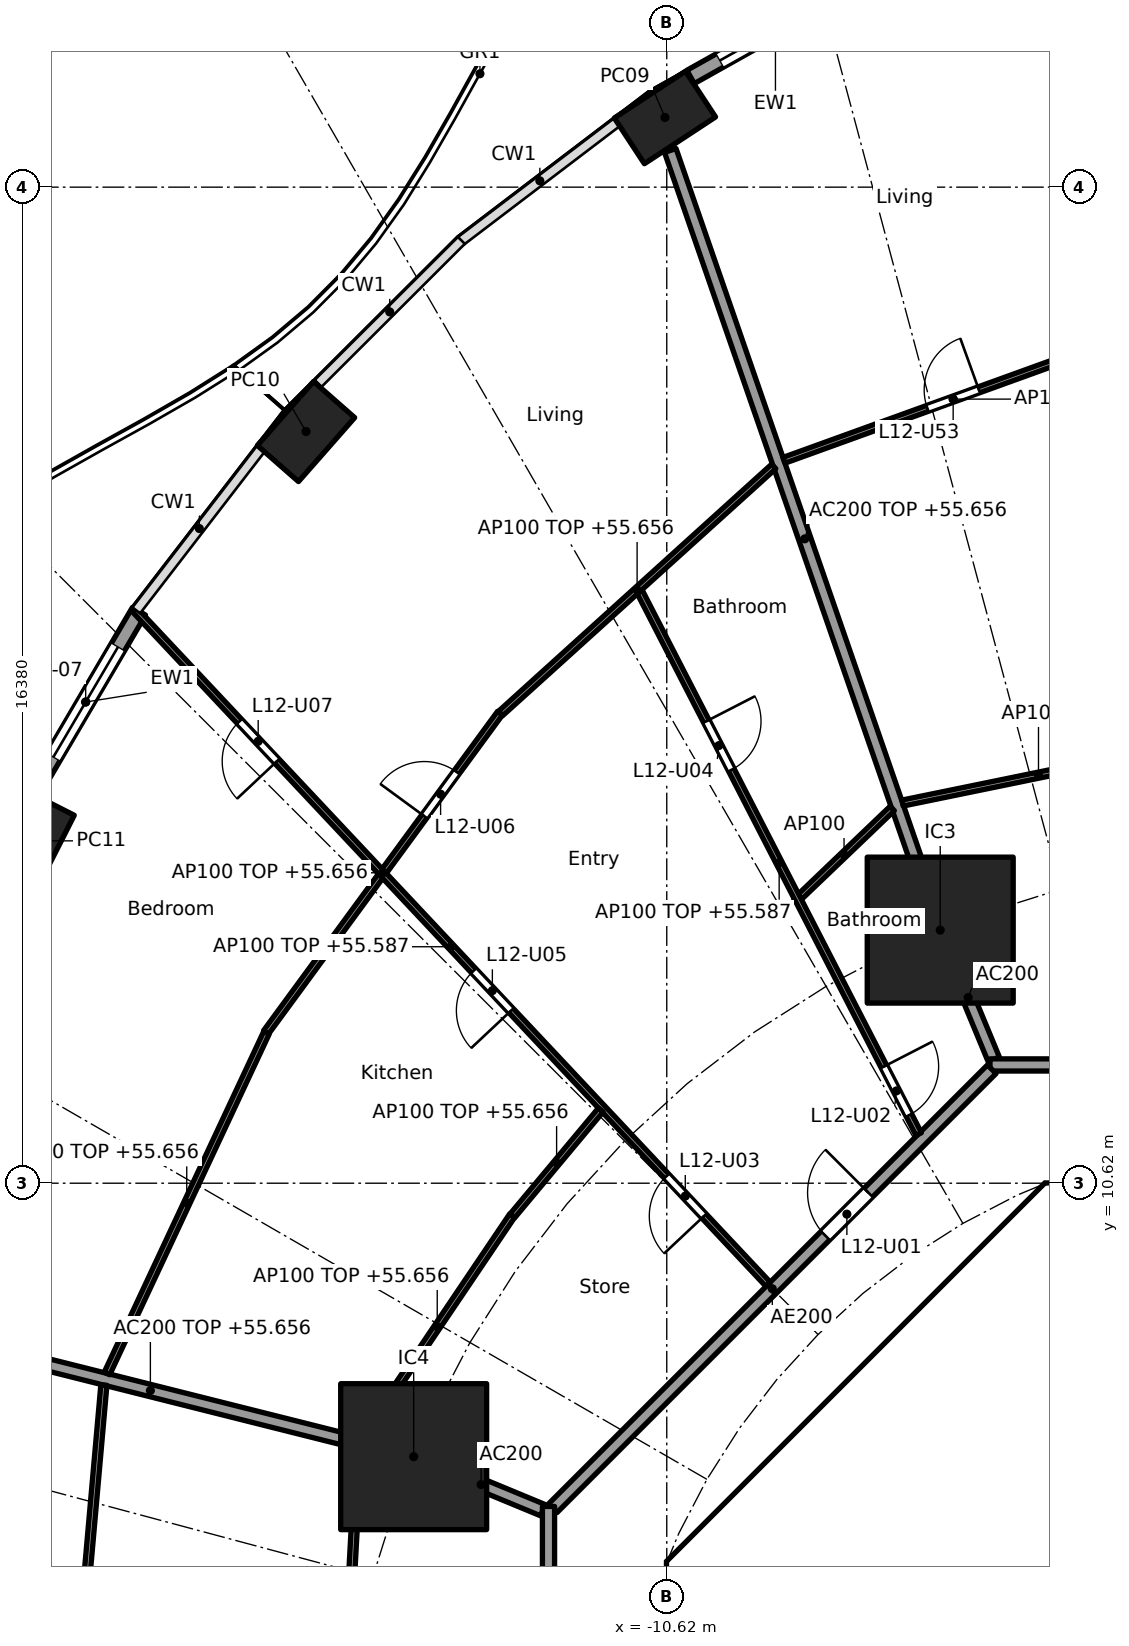
"""IFC4 building model, lengths in metres.
Left out: names, types, materials, properties, quantities, classifications, styles, units other than length and angle.
Written with IfcOpenShell. Run it as: python <this file> out.ifc"""

import sys

from ifc_helpers import new_model, si_unit, direction, frame, frame_2d, origin, origin_2d, place, context, subcontext, project, spatial, polyline, rectangle, hollow_rectangle, outline, extrude, element, fill, save


model = new_model("IFC4")
c1 = context("Model", 3, precision=1e-05, world=origin(), true_north=direction((0.0, 1.0)))
c2 = subcontext(c1, "Body", "Model", "MODEL_VIEW")
j1 = project(units=[si_unit("LENGTHUNIT", "METRE"), si_unit("PLANEANGLEUNIT", "RADIAN")], contexts=[c1])
p1 = place(None, origin())
s1 = spatial("IfcSite", under=j1, at=p1, CompositionType="ELEMENT")
p2 = place(p1, origin())
s2 = spatial("IfcBuilding", under=s1, at=p2, CompositionType="ELEMENT")
p3 = place(p2, frame((0.0, 0.0, 52.9)))
s3 = spatial("IfcBuildingStorey", under=s2, at=p3, CompositionType="ELEMENT", Elevation=52.9)
for number, where, z_axis, x_axis in (
    (1, (-10.65, 28.146, 0.0), (0.0, 0.0, 1.0), (-0.836, -0.549, 0.0)),
    (2, (-16.552, 22.981, 0.0), (0.0, 0.0, 1.0), (-0.66, -0.751, 0.0)),
    (3, (-21.082, 16.25, 0.0), (0.0, 0.0, 1.0), (-0.452, -0.892, 0.0)),
):
    element("IfcColumn", number, at=place(p3, frame(where, z_axis=z_axis, x_axis=x_axis)), inside=s3, PredefinedType="COLUMN", context=c2, shape_type="SweptSolid", body=[
        extrude(hollow_rectangle(XDim=1.4, YDim=0.9, WallThickness=0.05, at=origin_2d()), origin(), (0.0, 0.0, 1.0), 3.7),
    ])
for number, where, z_axis, x_axis in (
    (4, (-6.123, 14.782, 0.0), (0.0, 0.0, 1.0), (1.0, 0.0, 0.0)),
    (5, (-14.782, 6.123, 0.0), (0.0, 0.0, 1.0), (1.0, 0.0, 0.0)),
):
    element("IfcColumn", number, at=place(p3, frame(where, z_axis=z_axis, x_axis=x_axis)), inside=s3, PredefinedType="COLUMN", context=c2, shape_type="SweptSolid", body=[
        extrude(rectangle(XDim=2.4, YDim=2.4, at=origin_2d()), origin(), (0.0, 0.0, 1.0), 3.7),
    ])
p4 = place(p3, frame((-10.228, 28.812, 0.0), z_axis=(0.0, 0.0, 1.0), x_axis=(0.872084295691, 0.489355679653, 0.0)))
e6 = element("IfcWall", 6, at=p4, inside=s3, PredefinedType="SOLIDWALL", context=c2, shape_type="SweptSolid", body=[
    extrude(rectangle(XDim=3.201, YDim=0.25, at=frame_2d((1.601, 0.0))), origin(), (0.0, 0.0, 1.0), 3.44),
])
p5 = place(p4, frame((0.551, 0.0, 0.0)))
e7 = element("IfcOpeningElement", 7, at=p5, cuts=e6, PredefinedType="OPENING", context=c2, shape_type="SweptSolid", body=[
    extrude(rectangle(XDim=2.1, YDim=2.4, at=frame_2d((1.05, 1.2))), frame((0.0, 0.135, 0.0), z_axis=(0.0, -1.0, 0.0), x_axis=(1.0, 0.0, 0.0)), (0.0, 0.0, 1.0), 0.27),
])
p6 = place(p3, frame((-21.052, 17.04, 0.0), z_axis=(0.0, 0.0, 1.0), x_axis=(0.506311160839, 0.862350861546, 0.0)))
e8 = element("IfcWall", 8, at=p6, inside=s3, PredefinedType="SOLIDWALL", context=c2, shape_type="SweptSolid", body=[
    extrude(rectangle(XDim=3.462, YDim=0.25, at=frame_2d((1.731, 0.0))), origin(), (0.0, 0.0, 1.0), 3.44),
])
p7 = place(p6, frame((0.681, 0.0, 0.0)))
e9 = element("IfcOpeningElement", 9, at=p7, cuts=e8, PredefinedType="OPENING", context=c2, shape_type="SweptSolid", body=[
    extrude(rectangle(XDim=2.1, YDim=2.4, at=frame_2d((1.05, 1.2))), frame((0.0, 0.135, 0.0), z_axis=(0.0, -1.0, 0.0), x_axis=(1.0, 0.0, 0.0)), (0.0, 0.0, 1.0), 0.27),
])
p8 = place(p3, frame((-4.613, 9.988, 0.0), z_axis=(0.0, 0.0, 1.0), x_axis=(-0.707106781187, -0.707106781187, 0.0)))
e10 = element("IfcWall", 10, at=p8, inside=s3, PredefinedType="SHEAR", context=c2, shape_type="SweptSolid", body=[
    extrude(rectangle(XDim=7.602, YDim=0.6, at=frame_2d((3.801, 0.0))), origin(), (0.0, 0.0, 1.0), 3.44),
])
p9 = place(p8, frame((0.351, 0.0, 0.0)))
e11 = element("IfcOpeningElement", 11, at=p9, cuts=e10, PredefinedType="OPENING", context=c2, shape_type="SweptSolid", body=[
    extrude(rectangle(XDim=1.1, YDim=2.1, at=frame_2d((0.55, 1.05))), frame((0.0, 0.31, 0.0), z_axis=(0.0, -1.0, 0.0), x_axis=(1.0, 0.0, 0.0)), (0.0, 0.0, 1.0), 0.62),
])
p10 = place(p3, frame((-5.8, 4.3, 0.0), z_axis=(0.0, 0.0, 1.0), x_axis=(0.0, 1.0, 0.0)))
e12 = element("IfcWall", 12, at=p10, inside=s3, PredefinedType="PARTITIONING", context=c2, shape_type="SweptSolid", body=[
    extrude(rectangle(XDim=3.927, YDim=0.15, at=frame_2d((1.963, 0.0))), origin(), (0.0, 0.0, 1.0), 3.44),
])
p11 = place(p10, frame((1.551, 0.0, 0.0)))
e13 = element("IfcOpeningElement", 13, at=p11, cuts=e12, PredefinedType="OPENING", context=c2, shape_type="SweptSolid", body=[
    extrude(rectangle(XDim=0.9, YDim=2.1, at=frame_2d((0.45, 1.05))), frame((0.0, 0.085, 0.0), z_axis=(0.0, -1.0, 0.0), x_axis=(1.0, 0.0, 0.0)), (0.0, 0.0, 1.0), 0.17),
])
p12 = place(p3, origin())
e14 = element("IfcWall", 14, at=p12, inside=s3, PredefinedType="SHEAR", context=c2, shape_type="SweptSolid", body=[
    extrude(outline(polyline([(-10.2, 4.825), (-9.776, 4.401), (-10.025, 4.152), (-10.025, 3.801), (-10.625, 3.801), (-10.625, 4.401), (-10.2, 4.825)])), origin(), (0.0, 0.0, 1.0), 3.44),
])
p13 = place(p3, origin())
e15 = element("IfcWall", 15, at=p13, inside=s3, PredefinedType="SHEAR", context=c2, shape_type="SweptSolid", body=[
    extrude(outline(polyline([(-4.152, 10.025), (-4.401, 9.776), (-4.825, 10.2), (-4.401, 10.625), (4.401, 10.625), (4.825, 10.2), (4.401, 9.776), (4.152, 10.025), (-4.152, 10.025)])), origin(), (0.0, 0.0, 1.0), 3.44),
])
p14 = place(p3, frame((-5.243, 12.657, 0.0), z_axis=(0.0, 0.0, 1.0), x_axis=(-0.382668627144, 0.923885664896, 0.0)))
e16 = element("IfcWall", 16, at=p14, inside=s3, PredefinedType="PARTITIONING", context=c2, shape_type="SweptSolid", body=[
    extrude(rectangle(XDim=2.2, YDim=0.2, at=frame_2d((1.1, 0.0))), origin(), (0.0, 0.0, 1.0), 3.44),
])
p15 = place(p3, frame((-6.139, 14.829, 0.0), z_axis=(0.0, 0.0, 1.0), x_axis=(-0.327178799566, 0.944962450637, 0.0)))
e17 = element("IfcWall", 17, at=p15, inside=s3, PredefinedType="PARTITIONING", context=c2, shape_type="SweptSolid", body=[
    extrude(rectangle(XDim=13.517, YDim=0.2, at=frame_2d((6.759, 0.0))), origin(), (0.0, 0.0, 1.0), 2.756),
])
p16 = place(p3, frame((-12.657, 5.243, 0.0), z_axis=(0.0, 0.0, 1.0), x_axis=(-0.923885664896, 0.382668627144, 0.0)))
e18 = element("IfcWall", 18, at=p16, inside=s3, PredefinedType="PARTITIONING", context=c2, shape_type="SweptSolid", body=[
    extrude(rectangle(XDim=2.2, YDim=0.2, at=frame_2d((1.1, 0.0))), origin(), (0.0, 0.0, 1.0), 3.44),
])
p17 = place(p3, frame((-14.831, 6.135, 0.0), z_axis=(0.0, 0.0, 1.0), x_axis=(-0.969884949569, 0.243563512454, 0.0)))
e19 = element("IfcWall", 19, at=p17, inside=s3, PredefinedType="PARTITIONING", context=c2, shape_type="SweptSolid", body=[
    extrude(rectangle(XDim=8.829, YDim=0.2, at=frame_2d((4.415, 0.0))), origin(), (0.0, 0.0, 1.0), 2.756),
])
p18 = place(p3, frame((5.104, 12.565, 0.0), z_axis=(0.0, 0.0, 1.0), x_axis=(-1.0, 0.0, 0.0)))
e20 = element("IfcWall", 20, at=p18, inside=s3, PredefinedType="PARTITIONING", context=c2, shape_type="SweptSolid", body=[
    extrude(rectangle(XDim=10.409, YDim=0.2, at=frame_2d((5.205, 0.0))), origin(), (0.0, 0.0, 1.0), 3.44),
])
p19 = place(p18, frame((1.185, 0.0, 0.0)))
e21 = element("IfcOpeningElement", 21, at=p19, cuts=e20, PredefinedType="OPENING", context=c2, shape_type="SweptSolid", body=[
    extrude(rectangle(XDim=1.0, YDim=2.1, at=frame_2d((0.5, 1.05))), frame((0.0, 0.11, 0.0), z_axis=(0.0, -1.0, 0.0), x_axis=(1.0, 0.0, 0.0)), (0.0, 0.0, 1.0), 0.22),
])
p20 = place(p3, frame((-5.275, 12.494, 0.0), z_axis=(0.0, 0.0, 1.0), x_axis=(-0.707106781187, -0.707106781187, 0.0)))
e22 = element("IfcWall", 22, at=p20, inside=s3, PredefinedType="PARTITIONING", context=c2, shape_type="SweptSolid", body=[
    extrude(rectangle(XDim=10.209, YDim=0.2, at=frame_2d((5.104, 0.0))), origin(), (0.0, 0.0, 1.0), 3.44),
])
p21 = place(p20, frame((2.87, 0.0, 0.0)))
e23 = element("IfcOpeningElement", 23, at=p21, cuts=e22, PredefinedType="OPENING", context=c2, shape_type="SweptSolid", body=[
    extrude(rectangle(XDim=1.0, YDim=2.1, at=frame_2d((0.5, 1.05))), frame((0.0, 0.11, 0.0), z_axis=(0.0, -1.0, 0.0), x_axis=(1.0, 0.0, 0.0)), (0.0, 0.0, 1.0), 0.22),
])
p22 = place(p3, frame((-12.565, 5.304, 0.0), z_axis=(0.0, 0.0, 1.0), x_axis=(0.0, -1.0, 0.0)))
e24 = element("IfcWall", 24, at=p22, inside=s3, PredefinedType="PARTITIONING", context=c2, shape_type="SweptSolid", body=[
    extrude(rectangle(XDim=10.409, YDim=0.2, at=frame_2d((5.205, 0.0))), origin(), (0.0, 0.0, 1.0), 3.44),
])
p23 = place(p22, frame((6.106, 0.0, 0.0)))
e25 = element("IfcOpeningElement", 25, at=p23, cuts=e24, PredefinedType="OPENING", context=c2, shape_type="SweptSolid", body=[
    extrude(rectangle(XDim=1.0, YDim=2.1, at=frame_2d((0.5, 1.05))), frame((0.0, 0.11, 0.0), z_axis=(0.0, -1.0, 0.0), x_axis=(1.0, 0.0, 0.0)), (0.0, 0.0, 1.0), 0.22),
])
p24 = place(p3, frame((-2.272, 17.789, 0.0), z_axis=(0.0, 0.0, 1.0), x_axis=(-0.979595137747, -0.200981009307, 0.0)))
e26 = element("IfcWall", 26, at=p24, inside=s3, PredefinedType="PARTITIONING", context=c2, shape_type="SweptSolid", body=[
    extrude(rectangle(XDim=4.562, YDim=0.1, at=frame_2d((2.281, 0.0))), origin(), (0.0, 0.0, 1.0), 2.756),
])
p25 = place(p3, frame((-3.128, 24.521, 0.0), z_axis=(0.0, 0.0, 1.0), x_axis=(-0.940401494588, -0.340066212636, 0.0)))
e27 = element("IfcWall", 27, at=p25, inside=s3, PredefinedType="PARTITIONING", context=c2, shape_type="SweptSolid", body=[
    extrude(rectangle(XDim=5.917, YDim=0.1, at=frame_2d((2.958, 0.0))), origin(), (0.0, 0.0, 1.0), 2.756),
])
p26 = place(p25, frame((2.509, 0.0, 0.0)))
e28 = element("IfcOpeningElement", 28, at=p26, cuts=e27, PredefinedType="OPENING", context=c2, shape_type="SweptSolid", body=[
    extrude(rectangle(XDim=0.9, YDim=2.1, at=frame_2d((0.45, 1.05))), frame((0.0, 0.06, 0.0), z_axis=(0.0, -1.0, 0.0), x_axis=(1.0, 0.0, 0.0)), (0.0, 0.0, 1.0), 0.12),
])
p27 = place(p3, frame((-6.912, 16.782, 0.0), z_axis=(0.0, 0.0, 1.0), x_axis=(-0.722789289931, -0.691068478778, 0.0)))
e29 = element("IfcWall", 29, at=p27, inside=s3, PredefinedType="PARTITIONING", context=c2, shape_type="SweptSolid", body=[
    extrude(rectangle(XDim=2.194, YDim=0.1, at=frame_2d((1.097, 0.0))), origin(), (0.0, 0.0, 1.0), 3.44),
])
p28 = place(p3, frame((-8.861, 22.407, 0.0), z_axis=(0.0, 0.0, 1.0), x_axis=(-0.741713303551, -0.670717060567, 0.0)))
e30 = element("IfcWall", 30, at=p28, inside=s3, PredefinedType="PARTITIONING", context=c2, shape_type="SweptSolid", body=[
    extrude(rectangle(XDim=6.059, YDim=0.1, at=frame_2d((3.03, 0.0))), origin(), (0.0, 0.0, 1.0), 2.756),
])
p29 = place(p3, frame((-6.477, 11.427, 0.0), z_axis=(0.0, 0.0, 1.0), x_axis=(-0.457464037982, 0.889228122561, 0.0)))
e31 = element("IfcWall", 31, at=p29, inside=s3, PredefinedType="PARTITIONING", context=c2, shape_type="SweptSolid", body=[
    extrude(rectangle(XDim=10.032, YDim=0.1, at=frame_2d((5.016, 0.0))), origin(), (0.0, 0.0, 1.0), 2.687),
])
p30 = place(p29, frame((0.35, 0.0, 0.0)))
e32 = element("IfcOpeningElement", 32, at=p30, cuts=e31, PredefinedType="OPENING", context=c2, shape_type="SweptSolid", body=[
    extrude(rectangle(XDim=0.9, YDim=2.1, at=frame_2d((0.45, 1.05))), frame((0.0, 0.06, 0.0), z_axis=(0.0, -1.0, 0.0), x_axis=(1.0, 0.0, 0.0)), (0.0, 0.0, 1.0), 0.12),
])
p31 = place(p29, frame((6.735, 0.0, 0.0)))
e33 = element("IfcOpeningElement", 33, at=p31, cuts=e31, PredefinedType="OPENING", context=c2, shape_type="SweptSolid", body=[
    extrude(rectangle(XDim=0.9, YDim=2.1, at=frame_2d((0.45, 1.05))), frame((0.0, 0.06, 0.0), z_axis=(0.0, -1.0, 0.0), x_axis=(1.0, 0.0, 0.0)), (0.0, 0.0, 1.0), 0.12),
])
p32 = place(p3, frame((-13.362, 18.35, 0.0), z_axis=(0.0, 0.0, 1.0), x_axis=(-0.591191311491, -0.806531359104, 0.0)))
e34 = element("IfcWall", 34, at=p32, inside=s3, PredefinedType="PARTITIONING", context=c2, shape_type="SweptSolid", body=[
    extrude(rectangle(XDim=6.51, YDim=0.1, at=frame_2d((3.255, 0.0))), origin(), (0.0, 0.0, 1.0), 2.756),
])
p33 = place(p32, frame((1.202, 0.0, 0.0)))
e35 = element("IfcOpeningElement", 35, at=p33, cuts=e34, PredefinedType="OPENING", context=c2, shape_type="SweptSolid", body=[
    extrude(rectangle(XDim=0.9, YDim=2.1, at=frame_2d((0.45, 1.05))), frame((0.0, 0.06, 0.0), z_axis=(0.0, -1.0, 0.0), x_axis=(1.0, 0.0, 0.0)), (0.0, 0.0, 1.0), 0.12),
])
p34 = place(p3, frame((-8.953, 8.958, 0.0), z_axis=(0.0, 0.0, 1.0), x_axis=(-0.684574307023, 0.728943082939, 0.0)))
e36 = element("IfcWall", 36, at=p34, inside=s3, PredefinedType="PARTITIONING", context=c2, shape_type="SweptSolid", body=[
    extrude(rectangle(XDim=15.231, YDim=0.1, at=frame_2d((7.615, 0.0))), origin(), (0.0, 0.0, 1.0), 2.687),
])
p35 = place(p34, frame((1.54, 0.0, 0.0)))
e37 = element("IfcOpeningElement", 37, at=p35, cuts=e36, PredefinedType="OPENING", context=c2, shape_type="SweptSolid", body=[
    extrude(rectangle(XDim=0.9, YDim=2.1, at=frame_2d((0.45, 1.05))), frame((0.0, 0.06, 0.0), z_axis=(0.0, -1.0, 0.0), x_axis=(1.0, 0.0, 0.0)), (0.0, 0.0, 1.0), 0.12),
])
p36 = place(p34, frame((6.174, 0.0, 0.0)))
e38 = element("IfcOpeningElement", 38, at=p36, cuts=e36, PredefinedType="OPENING", context=c2, shape_type="SweptSolid", body=[
    extrude(rectangle(XDim=0.9, YDim=2.1, at=frame_2d((0.45, 1.05))), frame((0.0, 0.06, 0.0), z_axis=(0.0, -1.0, 0.0), x_axis=(1.0, 0.0, 0.0)), (0.0, 0.0, 1.0), 0.12),
])
p37 = place(p34, frame((11.8, 0.0, 0.0)))
e39 = element("IfcOpeningElement", 39, at=p37, cuts=e36, PredefinedType="OPENING", context=c2, shape_type="SweptSolid", body=[
    extrude(rectangle(XDim=0.9, YDim=2.1, at=frame_2d((0.45, 1.05))), frame((0.0, 0.06, 0.0), z_axis=(0.0, -1.0, 0.0), x_axis=(1.0, 0.0, 0.0)), (0.0, 0.0, 1.0), 0.12),
])
p38 = place(p3, frame((-11.705, 11.825, 0.0), z_axis=(0.0, 0.0, 1.0), x_axis=(-0.640861724905, -0.767656335577, 0.0)))
e40 = element("IfcWall", 40, at=p38, inside=s3, PredefinedType="PARTITIONING", context=c2, shape_type="SweptSolid", body=[
    extrude(rectangle(XDim=2.268, YDim=0.1, at=frame_2d((1.134, 0.0))), origin(), (0.0, 0.0, 1.0), 2.756),
])
p39 = place(p3, frame((-13.162, 10.087, 0.0), z_axis=(0.0, 0.0, 1.0), x_axis=(-0.55912750241, -0.829081682375, 0.0)))
e41 = element("IfcWall", 41, at=p39, inside=s3, PredefinedType="PARTITIONING", context=c2, shape_type="SweptSolid", body=[
    extrude(rectangle(XDim=4.408, YDim=0.1, at=frame_2d((2.204, 0.0))), origin(), (0.0, 0.0, 1.0), 2.756),
])
p40 = place(p3, frame((-17.203, 13.095, 0.0), z_axis=(0.0, 0.0, 1.0), x_axis=(-0.423926333401, -0.905696673202, 0.0)))
e42 = element("IfcWall", 42, at=p40, inside=s3, PredefinedType="PARTITIONING", context=c2, shape_type="SweptSolid", body=[
    extrude(rectangle(XDim=6.188, YDim=0.1, at=frame_2d((3.094, 0.0))), origin(), (0.0, 0.0, 1.0), 2.756),
])
p41 = place(p3, frame((-15.688, 6.249, 0.0), z_axis=(0.0, 0.0, 1.0), x_axis=(-0.054659814056, -0.998505034903, 0.0)))
e43 = element("IfcWall", 43, at=p41, inside=s3, PredefinedType="PARTITIONING", context=c2, shape_type="SweptSolid", body=[
    extrude(rectangle(XDim=6.208, YDim=0.1, at=frame_2d((3.104, 0.0))), origin(), (0.0, 0.0, 1.0), 2.756),
])
p42 = place(p3, frame((-19.877, 7.301, 0.0), z_axis=(0.0, 0.0, 1.0), x_axis=(-0.088143415068, -0.996107794558, 0.0)))
e44 = element("IfcWall", 44, at=p42, inside=s3, PredefinedType="PARTITIONING", context=c2, shape_type="SweptSolid", body=[
    extrude(rectangle(XDim=7.279, YDim=0.1, at=frame_2d((3.64, 0.0))), origin(), (0.0, 0.0, 1.0), 2.756),
])
p43 = place(p42, frame((3.189, 0.0, 0.0)))
e45 = element("IfcOpeningElement", 45, at=p43, cuts=e44, PredefinedType="OPENING", context=c2, shape_type="SweptSolid", body=[
    extrude(rectangle(XDim=0.9, YDim=2.1, at=frame_2d((0.45, 1.05))), frame((0.0, 0.06, 0.0), z_axis=(0.0, -1.0, 0.0), x_axis=(1.0, 0.0, 0.0)), (0.0, 0.0, 1.0), 0.12),
])
p44 = place(p5, origin())
e46 = element("IfcDoor", 46, at=p44, inside=s3, OperationType="SLIDING_TO_LEFT", PredefinedType="DOOR", context=c2, shape_type="SweptSolid", body=[
    extrude(rectangle(XDim=2.1, YDim=2.4, at=frame_2d((1.05, 1.2))), frame((0.0, 0.025, 0.0), z_axis=(0.0, -1.0, 0.0), x_axis=(1.0, 0.0, 0.0)), (0.0, 0.0, 1.0), 0.05),
])
fill(e7, e46)
p45 = place(p7, origin())
e47 = element("IfcDoor", 47, at=p45, inside=s3, OperationType="SLIDING_TO_LEFT", PredefinedType="DOOR", context=c2, shape_type="SweptSolid", body=[
    extrude(rectangle(XDim=2.1, YDim=2.4, at=frame_2d((1.05, 1.2))), frame((0.0, 0.025, 0.0), z_axis=(0.0, -1.0, 0.0), x_axis=(1.0, 0.0, 0.0)), (0.0, 0.0, 1.0), 0.05),
])
fill(e9, e47)
p46 = place(p11, origin())
e48 = element("IfcDoor", 48, at=p46, inside=s3, OperationType="SINGLE_SWING_LEFT", PredefinedType="DOOR", context=c2, shape_type="SweptSolid", body=[
    extrude(rectangle(XDim=0.9, YDim=2.1, at=frame_2d((0.45, 1.05))), frame((0.0, 0.025, 0.0), z_axis=(0.0, -1.0, 0.0), x_axis=(1.0, 0.0, 0.0)), (0.0, 0.0, 1.0), 0.05),
])
fill(e13, e48)
p47 = place(p9, origin())
e49 = element("IfcDoor", 49, at=p47, inside=s3, OperationType="SINGLE_SWING_LEFT", PredefinedType="DOOR", context=c2, shape_type="SweptSolid", body=[
    extrude(rectangle(XDim=1.1, YDim=2.1, at=frame_2d((0.55, 1.05))), frame((0.0, 0.025, 0.0), z_axis=(0.0, -1.0, 0.0), x_axis=(1.0, 0.0, 0.0)), (0.0, 0.0, 1.0), 0.05),
])
fill(e11, e49)
p48 = place(p21, frame((1.0, 0.0, 0.0), x_axis=(-1.0, 0.0, 0.0)))
e50 = element("IfcDoor", 50, at=p48, inside=s3, OperationType="SINGLE_SWING_RIGHT", PredefinedType="DOOR", context=c2, shape_type="SweptSolid", body=[
    extrude(rectangle(XDim=1.0, YDim=2.1, at=frame_2d((0.5, 1.05))), frame((0.0, 0.025, 0.0), z_axis=(0.0, -1.0, 0.0), x_axis=(1.0, 0.0, 0.0)), (0.0, 0.0, 1.0), 0.05),
])
fill(e23, e50)
p49 = place(p30, frame((0.9, 0.0, 0.0), x_axis=(-1.0, 0.0, 0.0)))
e51 = element("IfcDoor", 51, at=p49, inside=s3, OperationType="SINGLE_SWING_LEFT", PredefinedType="DOOR", context=c2, shape_type="SweptSolid", body=[
    extrude(rectangle(XDim=0.9, YDim=2.1, at=frame_2d((0.45, 1.05))), frame((0.0, 0.025, 0.0), z_axis=(0.0, -1.0, 0.0), x_axis=(1.0, 0.0, 0.0)), (0.0, 0.0, 1.0), 0.05),
])
fill(e32, e51)
p50 = place(p35, origin())
e52 = element("IfcDoor", 52, at=p50, inside=s3, OperationType="SINGLE_SWING_LEFT", PredefinedType="DOOR", context=c2, shape_type="SweptSolid", body=[
    extrude(rectangle(XDim=0.9, YDim=2.1, at=frame_2d((0.45, 1.05))), frame((0.0, 0.025, 0.0), z_axis=(0.0, -1.0, 0.0), x_axis=(1.0, 0.0, 0.0)), (0.0, 0.0, 1.0), 0.05),
])
fill(e37, e52)
p51 = place(p31, frame((0.9, 0.0, 0.0), x_axis=(-1.0, 0.0, 0.0)))
e53 = element("IfcDoor", 53, at=p51, inside=s3, OperationType="SINGLE_SWING_LEFT", PredefinedType="DOOR", context=c2, shape_type="SweptSolid", body=[
    extrude(rectangle(XDim=0.9, YDim=2.1, at=frame_2d((0.45, 1.05))), frame((0.0, 0.025, 0.0), z_axis=(0.0, -1.0, 0.0), x_axis=(1.0, 0.0, 0.0)), (0.0, 0.0, 1.0), 0.05),
])
fill(e33, e53)
p52 = place(p36, origin())
e54 = element("IfcDoor", 54, at=p52, inside=s3, OperationType="SINGLE_SWING_LEFT", PredefinedType="DOOR", context=c2, shape_type="SweptSolid", body=[
    extrude(rectangle(XDim=0.9, YDim=2.1, at=frame_2d((0.45, 1.05))), frame((0.0, 0.025, 0.0), z_axis=(0.0, -1.0, 0.0), x_axis=(1.0, 0.0, 0.0)), (0.0, 0.0, 1.0), 0.05),
])
fill(e38, e54)
p53 = place(p33, frame((0.9, 0.0, 0.0), x_axis=(-1.0, 0.0, 0.0)))
e55 = element("IfcDoor", 55, at=p53, inside=s3, OperationType="SINGLE_SWING_LEFT", PredefinedType="DOOR", context=c2, shape_type="SweptSolid", body=[
    extrude(rectangle(XDim=0.9, YDim=2.1, at=frame_2d((0.45, 1.05))), frame((0.0, 0.025, 0.0), z_axis=(0.0, -1.0, 0.0), x_axis=(1.0, 0.0, 0.0)), (0.0, 0.0, 1.0), 0.05),
])
fill(e35, e55)
p54 = place(p37, origin())
e56 = element("IfcDoor", 56, at=p54, inside=s3, OperationType="SINGLE_SWING_LEFT", PredefinedType="DOOR", context=c2, shape_type="SweptSolid", body=[
    extrude(rectangle(XDim=0.9, YDim=2.1, at=frame_2d((0.45, 1.05))), frame((0.0, 0.025, 0.0), z_axis=(0.0, -1.0, 0.0), x_axis=(1.0, 0.0, 0.0)), (0.0, 0.0, 1.0), 0.05),
])
fill(e39, e56)
p55 = place(p26, frame((0.9, 0.0, 0.0), x_axis=(-1.0, 0.0, 0.0)))
e57 = element("IfcDoor", 57, at=p55, inside=s3, OperationType="SINGLE_SWING_RIGHT", PredefinedType="DOOR", context=c2, shape_type="SweptSolid", body=[
    extrude(rectangle(XDim=0.9, YDim=2.1, at=frame_2d((0.45, 1.05))), frame((0.0, 0.025, 0.0), z_axis=(0.0, -1.0, 0.0), x_axis=(1.0, 0.0, 0.0)), (0.0, 0.0, 1.0), 0.05),
])
fill(e28, e57)
save(model, sys.argv[1])
